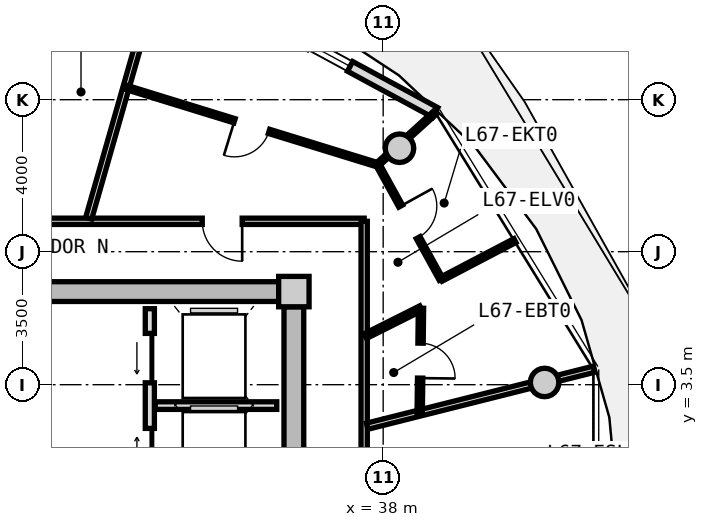
"""IFC4 building model, lengths in metres.
Left out: names, types, materials, properties, quantities, classifications, styles, units other than length and angle.
Written with IfcOpenShell. Run it as: python <this file> out.ifc"""

import sys

from ifc_helpers import new_model, si_unit, direction, frame, frame_2d, origin, origin_2d, place, context, subcontext, project, spatial, rectangle, circle, extrude, source, transform, mapped, element, fill, save


model = new_model("IFC4")
c1 = context("Model", 3, precision=1e-05, world=origin(), true_north=direction((0.0, 1.0)))
c2 = subcontext(c1, "Body", "Model", "MODEL_VIEW")
j1 = project(units=[si_unit("LENGTHUNIT", "METRE"), si_unit("PLANEANGLEUNIT", "RADIAN")], contexts=[c1])
p1 = place(None, origin())
s1 = spatial("IfcSite", under=j1, at=p1, CompositionType="ELEMENT")
p2 = place(p1, origin())
s2 = spatial("IfcBuilding", under=s1, at=p2, CompositionType="ELEMENT")
p3 = place(p2, frame((0.0, 0.0, 216.95)))
s3 = spatial("IfcBuildingStorey", under=s2, at=p3, CompositionType="ELEMENT", Elevation=216.95)
m1 = source(origin(), c2, "Body", "SweptSolid", [
    extrude(rectangle(XDim=0.8, YDim=0.8, at=origin_2d()), origin(), (0.0, 0.0, 1.0), 3.05),
])
p4 = place(p3, frame((35.65, 5.95, 0.0), z_axis=(0.0, 0.0, 1.0), x_axis=(1.0, 0.0, 0.0)))
e1 = element("IfcColumn", 1, at=p4, inside=s3, PredefinedType="COLUMN", context=c2, shape_type="MappedRepresentation", body=[
    mapped(m1, transform((0.0, 0.0, 0.0), x_axis=(1.0, 0.0, 0.0), y_axis=(0.0, 1.0, 0.0), z_axis=(0.0, 0.0, 1.0), scale=1.0)),
])
m2 = source(origin(), c2, "Body", "SweptSolid", [
    extrude(rectangle(XDim=14.5, YDim=0.52, at=frame_2d((7.25, 0.0))), origin(), (0.0, 0.0, 1.0), 2.76),
])
p5 = place(p3, frame((20.75, 5.95, 0.0), z_axis=(0.0, 0.0, 1.0), x_axis=(1.0, 0.0, 0.0)))
e2 = element("IfcWall", 2, at=p5, inside=s3, PredefinedType="SHEAR", context=c2, shape_type="MappedRepresentation", body=[
    mapped(m2, transform((0.0, 0.0, 0.0), x_axis=(1.0, 0.0, 0.0), y_axis=(0.0, 1.0, 0.0), z_axis=(0.0, 0.0, 1.0), scale=1.0)),
])
m3 = source(origin(), c2, "Body", "SweptSolid", [
    extrude(rectangle(XDim=11.1, YDim=0.52, at=frame_2d((5.55, 0.0))), origin(), (0.0, 0.0, 1.0), 2.76),
])
p6 = place(p3, frame((35.65, 5.55, 0.0), z_axis=(0.0, 0.0, 1.0), x_axis=(0.0, -1.0, 0.0)))
e3 = element("IfcWall", 3, at=p6, inside=s3, PredefinedType="SHEAR", context=c2, shape_type="MappedRepresentation", body=[
    mapped(m3, transform((0.0, 0.0, 0.0), x_axis=(1.0, 0.0, 0.0), y_axis=(0.0, 1.0, 0.0), z_axis=(0.0, 0.0, 1.0), scale=1.0)),
])
p7 = place(p6, frame((5.65, 0.0, 0.0)))
e4 = element("IfcOpeningElement", 4, at=p7, cuts=e3, PredefinedType="OPENING", context=c2, shape_type="SweptSolid", body=[
    extrude(rectangle(XDim=1.2, YDim=2.15, at=frame_2d((0.6, 1.075))), frame((0.0, 0.27, 0.0), z_axis=(0.0, -1.0, 0.0), x_axis=(1.0, 0.0, 0.0)), (0.0, 0.0, 1.0), 0.54),
])
m4 = source(origin(), c2, "Body", "SweptSolid", [
    extrude(circle(Radius=0.375, at=origin_2d()), origin(), (0.0, 0.0, 1.0), 3.05),
])
for number, where, z_axis, x_axis in (
    (5, (42.247, 3.559, 0.0), (0.0, 0.0, 1.0), (1.0, 0.0, 0.0)),
    (6, (38.43, 9.723, 0.0), (0.0, 0.0, 1.0), (1.0, 0.0, 0.0)),
):
    element("IfcColumn", number, at=place(p3, frame(where, z_axis=z_axis, x_axis=x_axis)), inside=s3, PredefinedType="COLUMN", context=c2, shape_type="MappedRepresentation", body=[
        mapped(m4, transform((0.0, 0.0, 0.0), x_axis=(1.0, 0.0, 0.0), y_axis=(0.0, 1.0, 0.0), z_axis=(0.0, 0.0, 1.0), scale=1.0)),
    ])
m5 = source(origin(), c2, "Body", "SweptSolid", [
    extrude(rectangle(XDim=8.197, YDim=0.29, at=frame_2d((4.099, 0.0))), origin(), (0.0, 0.0, 1.0), 2.76),
])
p8 = place(p3, frame((32.162, 14.566, 0.0), z_axis=(0.0, 0.0, 1.0), x_axis=(0.879369910001, -0.476139224791, 0.0)))
e7 = element("IfcWall", 7, at=p8, inside=s3, PredefinedType="SOLIDWALL", context=c2, shape_type="MappedRepresentation", body=[
    mapped(m5, transform((0.0, 0.0, 0.0), x_axis=(1.0, 0.0, 0.0), y_axis=(0.0, 1.0, 0.0), z_axis=(0.0, 0.0, 1.0), scale=1.0)),
])
p9 = place(p8, frame((0.9, 0.0, 0.0)))
e8 = element("IfcOpeningElement", 8, at=p9, cuts=e7, PredefinedType="OPENING", context=c2, shape_type="SweptSolid", body=[
    extrude(rectangle(XDim=1.15, YDim=2.25, at=frame_2d((0.575, 1.125))), frame((0.0, 0.155, 0.0), z_axis=(0.0, -1.0, 0.0), x_axis=(1.0, 0.0, 0.0)), (0.0, 0.0, 1.0), 0.31),
])
p10 = place(p8, frame((4.448, 0.0, 0.85)))
e9 = element("IfcOpeningElement", 9, at=p10, cuts=e7, PredefinedType="OPENING", context=c2, shape_type="SweptSolid", body=[
    extrude(rectangle(XDim=1.2, YDim=1.5, at=frame_2d((0.6, 0.75))), frame((0.0, 0.155, 0.0), z_axis=(0.0, -1.0, 0.0), x_axis=(1.0, 0.0, 0.0)), (0.0, 0.0, 1.0), 0.31),
])
m6 = source(origin(), c2, "Body", "SweptSolid", [
    extrude(rectangle(XDim=5.0, YDim=0.24, at=frame_2d((2.5, 0.0))), origin(), (0.0, 0.0, 1.0), 2.745),
])
p11 = place(p3, frame((31.86, 0.5, 0.0), z_axis=(0.0, 0.0, 1.0), x_axis=(0.0, 1.0, 0.0)))
e10 = element("IfcWall", 10, at=p11, inside=s3, PredefinedType="PARTITIONING", context=c2, shape_type="MappedRepresentation", body=[
    mapped(m6, transform((0.0, 0.0, 0.0), x_axis=(1.0, 0.0, 0.0), y_axis=(0.0, 1.0, 0.0), z_axis=(0.0, 0.0, 1.0), scale=1.0)),
])
p12 = place(p11, frame((3.05, 0.0, 0.0)))
e11 = element("IfcOpeningElement", 11, at=p12, cuts=e10, PredefinedType="OPENING", context=c2, shape_type="SweptSolid", body=[
    extrude(rectangle(XDim=1.3, YDim=2.2, at=frame_2d((0.65, 1.1))), frame((0.0, 0.13, 0.0), z_axis=(0.0, -1.0, 0.0), x_axis=(1.0, 0.0, 0.0)), (0.0, 0.0, 1.0), 0.26),
])
p13 = place(p11, frame((0.55, 0.0, 0.0)))
e12 = element("IfcOpeningElement", 12, at=p13, cuts=e10, PredefinedType="OPENING", context=c2, shape_type="SweptSolid", body=[
    extrude(rectangle(XDim=1.3, YDim=2.2, at=frame_2d((0.65, 1.1))), frame((0.0, 0.13, 0.0), z_axis=(0.0, -1.0, 0.0), x_axis=(1.0, 0.0, 0.0)), (0.0, 0.0, 1.0), 0.26),
])
m7 = source(origin(), c2, "Body", "SweptSolid", [
    extrude(rectangle(XDim=3.2, YDim=0.2, at=frame_2d((1.6, 0.0))), origin(), (0.0, 0.0, 1.0), 2.745),
])
p14 = place(p3, frame((32.0, 2.95, 0.0), z_axis=(0.0, 0.0, 1.0), x_axis=(1.0, 0.0, 0.0)))
e13 = element("IfcWall", 13, at=p14, inside=s3, PredefinedType="PARTITIONING", context=c2, shape_type="MappedRepresentation", body=[
    mapped(m7, transform((0.0, 0.0, 0.0), x_axis=(1.0, 0.0, 0.0), y_axis=(0.0, 1.0, 0.0), z_axis=(0.0, 0.0, 1.0), scale=1.0)),
])
m8 = source(origin(), c2, "Body", "SweptSolid", [
    extrude(rectangle(XDim=8.58, YDim=0.165, at=frame_2d((4.29, 0.0))), origin(), (0.0, 0.0, 1.0), 2.745),
])
p15 = place(p3, frame((28.92, 7.8, 0.0), z_axis=(0.0, 0.0, 1.0), x_axis=(1.0, 0.0, 0.0)))
e14 = element("IfcWall", 14, at=p15, inside=s3, PredefinedType="PARTITIONING", context=c2, shape_type="MappedRepresentation", body=[
    mapped(m8, transform((0.0, 0.0, 0.0), x_axis=(1.0, 0.0, 0.0), y_axis=(0.0, 1.0, 0.0), z_axis=(0.0, 0.0, 1.0), scale=1.0)),
])
p16 = place(p15, frame((4.32, 0.0, 0.0)))
e15 = element("IfcOpeningElement", 15, at=p16, cuts=e14, PredefinedType="OPENING", context=c2, shape_type="SweptSolid", body=[
    extrude(rectangle(XDim=1.05, YDim=2.15, at=frame_2d((0.525, 1.075))), frame((0.0, 0.093, 0.0), z_axis=(0.0, -1.0, 0.0), x_axis=(1.0, 0.0, 0.0)), (0.0, 0.0, 1.0), 0.185),
])
m9 = source(origin(), c2, "Body", "SweptSolid", [
    extrude(rectangle(XDim=6.88, YDim=0.165, at=frame_2d((3.44, 0.0))), origin(), (0.0, 0.0, 1.0), 2.745),
])
p17 = place(p3, frame((37.5, 7.8, 0.0), z_axis=(0.0, 0.0, 1.0), x_axis=(0.0, -1.0, 0.0)))
e16 = element("IfcWall", 16, at=p17, inside=s3, PredefinedType="PARTITIONING", context=c2, shape_type="MappedRepresentation", body=[
    mapped(m9, transform((0.0, 0.0, 0.0), x_axis=(1.0, 0.0, 0.0), y_axis=(0.0, 1.0, 0.0), z_axis=(0.0, 0.0, 1.0), scale=1.0)),
])
m10 = source(origin(), c2, "Body", "SweptSolid", [
    extrude(rectangle(XDim=6.974, YDim=0.165, at=frame_2d((3.487, 0.0))), origin(), (0.0, 0.0, 1.0), 2.345),
])
p18 = place(p3, frame((30.251, 7.88, 0.0), z_axis=(0.0, 0.0, 1.0), x_axis=(0.274707256801, 0.961527910703, 0.0)))
e17 = element("IfcWall", 17, at=p18, inside=s3, PredefinedType="PARTITIONING", context=c2, shape_type="MappedRepresentation", body=[
    mapped(m10, transform((0.0, 0.0, 0.0), x_axis=(1.0, 0.0, 0.0), y_axis=(0.0, 1.0, 0.0), z_axis=(0.0, 0.0, 1.0), scale=1.0)),
])
m11 = source(origin(), c2, "Body", "SweptSolid", [
    extrude(rectangle(XDim=6.157, YDim=0.165, at=frame_2d((3.079, 0.0))), origin(), (0.0, 0.0, 1.0), 2.345),
])
p19 = place(p3, frame((37.58, 2.407, 0.0), z_axis=(0.0, 0.0, 1.0), x_axis=(0.969840867184, 0.243738984038, 0.0)))
e18 = element("IfcWall", 18, at=p19, inside=s3, PredefinedType="PARTITIONING", context=c2, shape_type="MappedRepresentation", body=[
    mapped(m11, transform((0.0, 0.0, 0.0), x_axis=(1.0, 0.0, 0.0), y_axis=(0.0, 1.0, 0.0), z_axis=(0.0, 0.0, 1.0), scale=1.0)),
])
m12 = source(origin(), c2, "Body", "SweptSolid", [
    extrude(rectangle(XDim=6.919, YDim=0.115, at=frame_2d((3.459, 0.0))), origin(), (0.0, 0.0, 1.0), 2.745),
])
p20 = place(p3, frame((37.849, 9.287, 0.0), z_axis=(0.0, 0.0, 1.0), x_axis=(-0.955678249072, 0.294413118341, 0.0)))
e19 = element("IfcWall", 19, at=p20, inside=s3, PredefinedType="PARTITIONING", context=c2, shape_type="MappedRepresentation", body=[
    mapped(m12, transform((0.0, 0.0, 0.0), x_axis=(1.0, 0.0, 0.0), y_axis=(0.0, 1.0, 0.0), z_axis=(0.0, 0.0, 1.0), scale=1.0)),
])
p21 = place(p20, frame((2.985, 0.0, 0.0)))
e20 = element("IfcOpeningElement", 20, at=p21, cuts=e19, PredefinedType="OPENING", context=c2, shape_type="SweptSolid", body=[
    extrude(rectangle(XDim=0.95, YDim=2.1, at=frame_2d((0.475, 1.05))), frame((0.0, 0.067, 0.0), z_axis=(0.0, -1.0, 0.0), x_axis=(1.0, 0.0, 0.0)), (0.0, 0.0, 1.0), 0.135),
])
m13 = source(origin(), c2, "Body", "SweptSolid", [
    extrude(rectangle(XDim=2.072, YDim=0.115, at=frame_2d((1.036, 0.0))), origin(), (0.0, 0.0, 1.0), 2.345),
])
p22 = place(p3, frame((37.849, 9.287, 0.0), z_axis=(0.0, 0.0, 1.0), x_axis=(0.741410125356, 0.671052178314, 0.0)))
e21 = element("IfcWall", 21, at=p22, inside=s3, PredefinedType="PARTITIONING", context=c2, shape_type="MappedRepresentation", body=[
    mapped(m13, transform((0.0, 0.0, 0.0), x_axis=(1.0, 0.0, 0.0), y_axis=(0.0, 1.0, 0.0), z_axis=(0.0, 0.0, 1.0), scale=1.0)),
])
m14 = source(origin(), c2, "Body", "SweptSolid", [
    extrude(rectangle(XDim=1.638, YDim=0.14, at=frame_2d((0.819, 0.0))), origin(), (0.0, 0.0, 1.0), 2.745),
])
p23 = place(p3, frame((37.53, 4.778, 0.0), z_axis=(0.0, 0.0, 1.0), x_axis=(0.893919977945, 0.448226586707, 0.0)))
e22 = element("IfcWall", 22, at=p23, inside=s3, PredefinedType="PARTITIONING", context=c2, shape_type="MappedRepresentation", body=[
    mapped(m14, transform((0.0, 0.0, 0.0), x_axis=(1.0, 0.0, 0.0), y_axis=(0.0, 1.0, 0.0), z_axis=(0.0, 0.0, 1.0), scale=1.0)),
])
m15 = source(origin(), c2, "Body", "SweptSolid", [
    extrude(rectangle(XDim=2.759, YDim=0.14, at=frame_2d((1.379, 0.0))), origin(), (0.0, 0.0, 1.0), 2.745),
])
p24 = place(p3, frame((38.995, 5.513, 0.0), z_axis=(0.0, 0.0, 1.0), x_axis=(-0.01194710728, -0.999928630767, 0.0)))
e23 = element("IfcWall", 23, at=p24, inside=s3, PredefinedType="PARTITIONING", context=c2, shape_type="MappedRepresentation", body=[
    mapped(m15, transform((0.0, 0.0, 0.0), x_axis=(1.0, 0.0, 0.0), y_axis=(0.0, 1.0, 0.0), z_axis=(0.0, 0.0, 1.0), scale=1.0)),
])
p25 = place(p24, frame((0.919, 0.0, 0.0)))
e24 = element("IfcOpeningElement", 24, at=p25, cuts=e23, PredefinedType="OPENING", context=c2, shape_type="SweptSolid", body=[
    extrude(rectangle(XDim=0.92, YDim=2.1, at=frame_2d((0.46, 1.05))), frame((0.0, 0.08, 0.0), z_axis=(0.0, -1.0, 0.0), x_axis=(1.0, 0.0, 0.0)), (0.0, 0.0, 1.0), 0.16),
])
m16 = source(origin(), c2, "Body", "SweptSolid", [
    extrude(rectangle(XDim=2.193, YDim=0.115, at=frame_2d((1.097, 0.0))), origin(), (0.0, 0.0, 1.0), 2.745),
])
p26 = place(p3, frame((39.525, 6.275, 0.0), z_axis=(0.0, 0.0, 1.0), x_axis=(0.885783595046, 0.464098505435, 0.0)))
e25 = element("IfcWall", 25, at=p26, inside=s3, PredefinedType="PARTITIONING", context=c2, shape_type="MappedRepresentation", body=[
    mapped(m16, transform((0.0, 0.0, 0.0), x_axis=(1.0, 0.0, 0.0), y_axis=(0.0, 1.0, 0.0), z_axis=(0.0, 0.0, 1.0), scale=1.0)),
])
m17 = source(origin(), c2, "Body", "SweptSolid", [
    extrude(rectangle(XDim=3.45, YDim=0.115, at=frame_2d((1.725, 0.0))), origin(), (0.0, 0.0, 1.0), 2.745),
])
p27 = place(p3, frame((39.525, 6.275, 0.0), z_axis=(0.0, 0.0, 1.0), x_axis=(-0.483659007882, 0.875256513312, 0.0)))
e26 = element("IfcWall", 26, at=p27, inside=s3, PredefinedType="PARTITIONING", context=c2, shape_type="MappedRepresentation", body=[
    mapped(m17, transform((0.0, 0.0, 0.0), x_axis=(1.0, 0.0, 0.0), y_axis=(0.0, 1.0, 0.0), z_axis=(0.0, 0.0, 1.0), scale=1.0)),
])
p28 = place(p27, frame((1.25, 0.0, 0.0)))
e27 = element("IfcOpeningElement", 27, at=p28, cuts=e26, PredefinedType="OPENING", context=c2, shape_type="SweptSolid", body=[
    extrude(rectangle(XDim=0.95, YDim=2.1, at=frame_2d((0.475, 1.05))), frame((0.0, 0.067, 0.0), z_axis=(0.0, -1.0, 0.0), x_axis=(1.0, 0.0, 0.0)), (0.0, 0.0, 1.0), 0.135),
])
m18 = source(origin(), c2, "Body", "SweptSolid", [
    extrude(rectangle(XDim=1.2, YDim=1.5, at=frame_2d((0.6, 0.75))), frame((0.0, 0.03, 0.0), z_axis=(0.0, -1.0, 0.0), x_axis=(1.0, 0.0, 0.0)), (0.0, 0.0, 1.0), 0.06),
])
p29 = place(p10, origin())
e28 = element("IfcWindow", 28, at=p29, inside=s3, PartitioningType="SINGLE_PANEL", PredefinedType="WINDOW", context=c2, shape_type="MappedRepresentation", body=[
    mapped(m18, transform((0.0, 0.0, 0.0), x_axis=(1.0, 0.0, 0.0), y_axis=(0.0, 1.0, 0.0), z_axis=(0.0, 0.0, 1.0), scale=1.0)),
])
fill(e9, e28)
m19 = source(origin(), c2, "Body", "SweptSolid", [
    extrude(rectangle(XDim=1.3, YDim=2.2, at=frame_2d((0.65, 1.1))), frame((0.0, 0.025, 0.0), z_axis=(0.0, -1.0, 0.0), x_axis=(1.0, 0.0, 0.0)), (0.0, 0.0, 1.0), 0.05),
])
p30 = place(p12, origin())
e29 = element("IfcDoor", 29, at=p30, inside=s3, OperationType="SLIDING_TO_LEFT", PredefinedType="DOOR", context=c2, shape_type="MappedRepresentation", body=[
    mapped(m19, transform((0.0, 0.0, 0.0), x_axis=(1.0, 0.0, 0.0), y_axis=(0.0, 1.0, 0.0), z_axis=(0.0, 0.0, 1.0), scale=1.0)),
])
fill(e11, e29)
p31 = place(p13, origin())
e30 = element("IfcDoor", 30, at=p31, inside=s3, OperationType="SLIDING_TO_RIGHT", PredefinedType="DOOR", context=c2, shape_type="MappedRepresentation", body=[
    mapped(m19, transform((0.0, 0.0, 0.0), x_axis=(1.0, 0.0, 0.0), y_axis=(0.0, 1.0, 0.0), z_axis=(0.0, 0.0, 1.0), scale=1.0)),
])
fill(e12, e30)
m20 = source(origin(), c2, "Body", "SweptSolid", [
    extrude(rectangle(XDim=1.05, YDim=2.15, at=frame_2d((0.525, 1.075))), frame((0.0, 0.025, 0.0), z_axis=(0.0, -1.0, 0.0), x_axis=(1.0, 0.0, 0.0)), (0.0, 0.0, 1.0), 0.05),
])
p32 = place(p16, frame((1.05, 0.0, 0.0), z_axis=(0.0, 0.0, 1.0), x_axis=(-1.0, 0.0, 0.0)))
e31 = element("IfcDoor", 31, at=p32, inside=s3, OperationType="SINGLE_SWING_LEFT", PredefinedType="DOOR", context=c2, shape_type="MappedRepresentation", body=[
    mapped(m20, transform((0.0, 0.0, 0.0), x_axis=(1.0, 0.0, 0.0), y_axis=(0.0, 1.0, 0.0), z_axis=(0.0, 0.0, 1.0), scale=1.0)),
])
fill(e15, e31)
m21 = source(origin(), c2, "Body", "SweptSolid", [
    extrude(rectangle(XDim=0.92, YDim=2.1, at=frame_2d((0.46, 1.05))), frame((0.0, 0.025, 0.0), z_axis=(0.0, -1.0, 0.0), x_axis=(1.0, 0.0, 0.0)), (0.0, 0.0, 1.0), 0.05),
])
p33 = place(p25, origin())
e32 = element("IfcDoor", 32, at=p33, inside=s3, OperationType="SINGLE_SWING_RIGHT", PredefinedType="DOOR", context=c2, shape_type="MappedRepresentation", body=[
    mapped(m21, transform((0.0, 0.0, 0.0), x_axis=(1.0, 0.0, 0.0), y_axis=(0.0, 1.0, 0.0), z_axis=(0.0, 0.0, 1.0), scale=1.0)),
])
fill(e24, e32)
m22 = source(origin(), c2, "Body", "SweptSolid", [
    extrude(rectangle(XDim=0.95, YDim=2.1, at=frame_2d((0.475, 1.05))), frame((0.0, 0.025, 0.0), z_axis=(0.0, -1.0, 0.0), x_axis=(1.0, 0.0, 0.0)), (0.0, 0.0, 1.0), 0.05),
])
p34 = place(p28, frame((0.95, 0.0, 0.0), z_axis=(0.0, 0.0, 1.0), x_axis=(-1.0, 0.0, 0.0)))
e33 = element("IfcDoor", 33, at=p34, inside=s3, OperationType="SINGLE_SWING_LEFT", PredefinedType="DOOR", context=c2, shape_type="MappedRepresentation", body=[
    mapped(m22, transform((0.0, 0.0, 0.0), x_axis=(1.0, 0.0, 0.0), y_axis=(0.0, 1.0, 0.0), z_axis=(0.0, 0.0, 1.0), scale=1.0)),
])
fill(e27, e33)
p35 = place(p21, origin())
e34 = element("IfcDoor", 34, at=p35, inside=s3, OperationType="SINGLE_SWING_RIGHT", PredefinedType="DOOR", context=c2, shape_type="MappedRepresentation", body=[
    mapped(m22, transform((0.0, 0.0, 0.0), x_axis=(1.0, 0.0, 0.0), y_axis=(0.0, 1.0, 0.0), z_axis=(0.0, 0.0, 1.0), scale=1.0)),
])
fill(e20, e34)
save(model, sys.argv[1])
